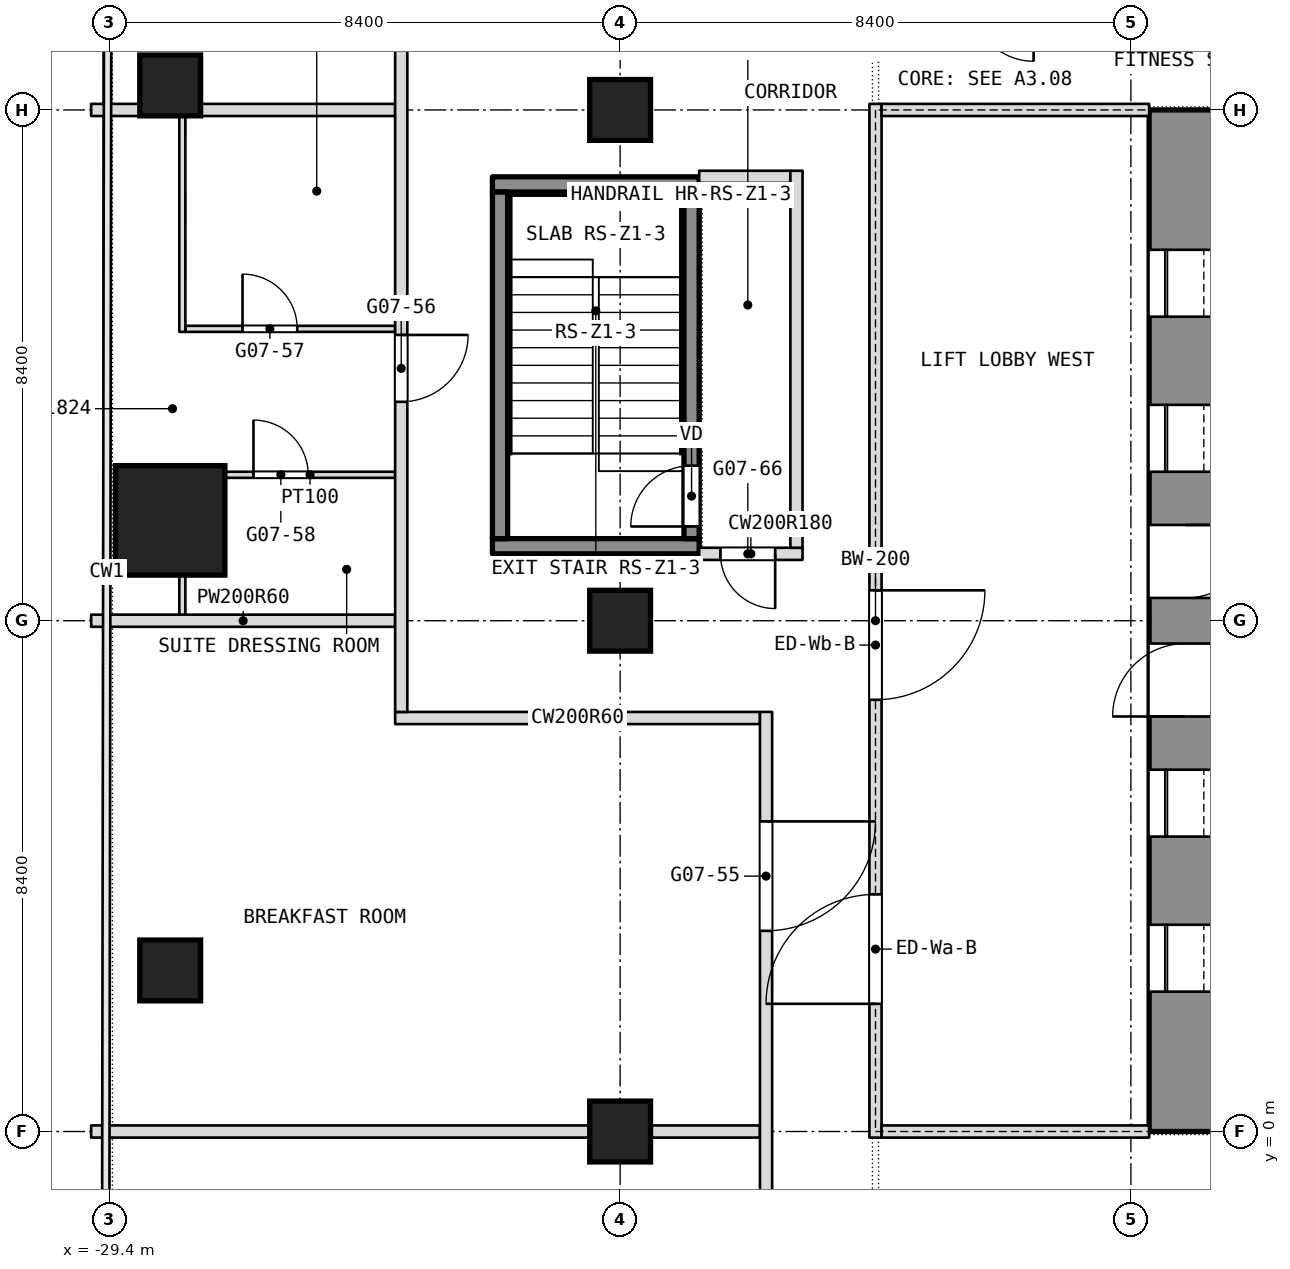
"""IFC4 building model, lengths in metres.
Left out: names, types, materials, properties, quantities, classifications, styles, units other than length and angle.
Written with IfcOpenShell. Run it as: python <this file> out.ifc"""

import sys

from ifc_helpers import new_model, si_unit, direction, frame, frame_2d, origin, origin_2d, place, context, subcontext, project, spatial, rectangle, extrude, element, fill, save


model = new_model("IFC4")
c1 = context("Model", 3, precision=1e-05, world=origin(), true_north=direction((0.0, 1.0)))
c2 = subcontext(c1, "Body", "Model", "MODEL_VIEW")
j1 = project(units=[si_unit("LENGTHUNIT", "METRE"), si_unit("PLANEANGLEUNIT", "RADIAN")], contexts=[c1])
p1 = place(None, origin())
s1 = spatial("IfcSite", under=j1, at=p1, CompositionType="ELEMENT")
p2 = place(p1, origin())
s2 = spatial("IfcBuilding", under=s1, at=p2, CompositionType="ELEMENT")
p3 = place(p2, frame((0.0, 0.0, 79.7)))
s3 = spatial("IfcBuildingStorey", under=s2, at=p3, CompositionType="ELEMENT", Elevation=79.7)
p4 = place(p3, frame((-11.7, 0.0, 0.0), z_axis=(0.0, 0.0, 1.0), x_axis=(0.0, 1.0, 0.0)))
e1 = element("IfcWall", 1, at=p4, inside=s3, PredefinedType="SHEAR", context=c2, shape_type="SweptSolid", body=[
    extrude(rectangle(XDim=16.8, YDim=1.2, at=frame_2d((8.4, 0.0))), origin(), (0.0, 0.0, 1.0), 3.6),
])
p5 = place(p4, frame((2.3, 0.0, 0.0)))
e2 = element("IfcOpeningElement", 2, at=p5, cuts=e1, PredefinedType="OPENING", context=c2, shape_type="SweptSolid", body=[
    extrude(rectangle(XDim=1.1, YDim=2.1, at=frame_2d((0.55, 1.05))), frame((0.0, 0.6, 0.0), z_axis=(0.0, -1.0, 0.0), x_axis=(1.0, 0.0, 0.0)), (0.0, 0.0, 1.0), 1.2),
])
p6 = place(p4, frame((4.85, 0.0, 0.0)))
e3 = element("IfcOpeningElement", 3, at=p6, cuts=e1, PredefinedType="OPENING", context=c2, shape_type="SweptSolid", body=[
    extrude(rectangle(XDim=1.1, YDim=2.1, at=frame_2d((0.55, 1.05))), frame((0.0, 0.6, 0.0), z_axis=(0.0, -1.0, 0.0), x_axis=(1.0, 0.0, 0.0)), (0.0, 0.0, 1.0), 1.2),
])
p7 = place(p4, frame((6.825, 0.0, 0.0)))
e4 = element("IfcOpeningElement", 4, at=p7, cuts=e1, PredefinedType="OPENING", context=c2, shape_type="SweptSolid", body=[
    extrude(rectangle(XDim=1.2, YDim=2.1, at=frame_2d((0.6, 1.05))), frame((0.0, 0.6, 0.0), z_axis=(0.0, -1.0, 0.0), x_axis=(1.0, 0.0, 0.0)), (0.0, 0.0, 1.0), 1.2),
])
p8 = place(p4, frame((13.4, 0.0, 0.0)))
e5 = element("IfcOpeningElement", 5, at=p8, cuts=e1, PredefinedType="OPENING", context=c2, shape_type="SweptSolid", body=[
    extrude(rectangle(XDim=1.1, YDim=2.1, at=frame_2d((0.55, 1.05))), frame((0.0, 0.6, 0.0), z_axis=(0.0, -1.0, 0.0), x_axis=(1.0, 0.0, 0.0)), (0.0, 0.0, 1.0), 1.2),
])
p9 = place(p4, frame((10.85, 0.0, 0.0)))
e6 = element("IfcOpeningElement", 6, at=p9, cuts=e1, PredefinedType="OPENING", context=c2, shape_type="SweptSolid", body=[
    extrude(rectangle(XDim=1.1, YDim=2.1, at=frame_2d((0.55, 1.05))), frame((0.0, 0.6, 0.0), z_axis=(0.0, -1.0, 0.0), x_axis=(1.0, 0.0, 0.0)), (0.0, 0.0, 1.0), 1.2),
])
p10 = place(p4, frame((8.775, 0.0, 0.0)))
e7 = element("IfcOpeningElement", 7, at=p10, cuts=e1, PredefinedType="OPENING", context=c2, shape_type="SweptSolid", body=[
    extrude(rectangle(XDim=1.2, YDim=2.1, at=frame_2d((0.6, 1.05))), frame((0.0, 0.6, 0.0), z_axis=(0.0, -1.0, 0.0), x_axis=(1.0, 0.0, 0.0)), (0.0, 0.0, 1.0), 1.2),
])
p11 = place(p3, frame((-28.4, 10.05, 0.0), z_axis=(0.0, 0.0, 1.0), x_axis=(1.0, 0.0, 0.0)))
e8 = element("IfcColumn", 8, at=p11, inside=s3, PredefinedType="COLUMN", context=c2, shape_type="SweptSolid", body=[
    extrude(rectangle(XDim=1.8, YDim=1.8, at=origin_2d()), origin(), (0.0, 0.0, 1.0), 3.6),
])
for number, where, z_axis, x_axis in (
    (9, (-21.0, 0.0, 0.0), (0.0, 0.0, 1.0), (1.0, 0.0, 0.0)),
    (10, (-21.0, 8.4, 0.0), (0.0, 0.0, 1.0), (1.0, 0.0, 0.0)),
    (11, (-21.0, 16.8, 0.0), (0.0, 0.0, 1.0), (1.0, 0.0, 0.0)),
    (12, (-28.4, 2.649, 0.0), (0.0, 0.0, 1.0), (1.0, 0.0, 0.0)),
    (13, (-28.4, 17.203, 0.0), (0.0, 0.0, 1.0), (1.0, 0.0, 0.0)),
):
    element("IfcColumn", number, at=place(p3, frame(where, z_axis=z_axis, x_axis=x_axis)), inside=s3, PredefinedType="COLUMN", context=c2, shape_type="SweptSolid", body=[
        extrude(rectangle(XDim=1.0, YDim=1.0, at=origin_2d()), origin(), (0.0, 0.0, 1.0), 3.6),
    ])
p12 = place(p3, frame((-29.7, 0.0, 0.0), z_axis=(0.0, 0.0, 1.0), x_axis=(1.0, 0.0, 0.0)))
e14 = element("IfcWall", 14, at=p12, inside=s3, PredefinedType="PARTITIONING", context=c2, shape_type="SweptSolid", body=[
    extrude(rectangle(XDim=11.0, YDim=0.2, at=frame_2d((5.5, 0.0))), origin(), (0.0, 0.0, 1.0), 2.84),
])
p13 = place(p3, frame((-24.7, 6.8, 0.0), z_axis=(0.0, 0.0, 1.0), x_axis=(1.0, 0.0, 0.0)))
e15 = element("IfcWall", 15, at=p13, inside=s3, PredefinedType="PARTITIONING", context=c2, shape_type="SweptSolid", body=[
    extrude(rectangle(XDim=6.0, YDim=0.2, at=frame_2d((3.0, 0.0))), origin(), (0.0, 0.0, 1.0), 3.34),
])
p14 = place(p3, frame((-29.7, 8.4, 0.0), z_axis=(0.0, 0.0, 1.0), x_axis=(1.0, 0.0, 0.0)))
e16 = element("IfcWall", 16, at=p14, inside=s3, PredefinedType="PARTITIONING", context=c2, shape_type="SweptSolid", body=[
    extrude(rectangle(XDim=5.0, YDim=0.2, at=frame_2d((2.5, 0.0))), origin(), (0.0, 0.0, 1.0), 2.84),
])
p15 = place(p3, frame((-19.7, 9.5, 0.0), z_axis=(0.0, 0.0, 1.0), x_axis=(1.0, 0.0, 0.0)))
e17 = element("IfcWall", 17, at=p15, inside=s3, PredefinedType="PARTITIONING", context=c2, shape_type="SweptSolid", body=[
    extrude(rectangle(XDim=1.7, YDim=0.2, at=frame_2d((0.85, 0.0))), origin(), (0.0, 0.0, 1.0), 3.34),
])
p16 = place(p15, frame((0.35, 0.0, 0.0)))
e18 = element("IfcOpeningElement", 18, at=p16, cuts=e17, PredefinedType="OPENING", context=c2, shape_type="SweptSolid", body=[
    extrude(rectangle(XDim=0.9, YDim=2.1, at=frame_2d((0.45, 1.05))), frame((0.0, 0.1, 0.0), z_axis=(0.0, -1.0, 0.0), x_axis=(1.0, 0.0, 0.0)), (0.0, 0.0, 1.0), 0.2),
])
p17 = place(p3, frame((-27.5, 10.8, 0.0), z_axis=(0.0, 0.0, 1.0), x_axis=(1.0, 0.0, 0.0)))
e19 = element("IfcWall", 19, at=p17, inside=s3, PredefinedType="PARTITIONING", context=c2, shape_type="SweptSolid", body=[
    extrude(rectangle(XDim=2.8, YDim=0.1, at=frame_2d((1.4, 0.0))), origin(), (0.0, 0.0, 1.0), 3.34),
])
p18 = place(p17, frame((0.47, 0.0, 0.0)))
e20 = element("IfcOpeningElement", 20, at=p18, cuts=e19, PredefinedType="OPENING", context=c2, shape_type="SweptSolid", body=[
    extrude(rectangle(XDim=0.9, YDim=2.1, at=frame_2d((0.45, 1.05))), frame((0.0, 0.05, 0.0), z_axis=(0.0, -1.0, 0.0), x_axis=(1.0, 0.0, 0.0)), (0.0, 0.0, 1.0), 0.1),
])
p19 = place(p3, frame((-28.15, 13.2, 0.0), z_axis=(0.0, 0.0, 1.0), x_axis=(1.0, 0.0, 0.0)))
e21 = element("IfcWall", 21, at=p19, inside=s3, PredefinedType="PARTITIONING", context=c2, shape_type="SweptSolid", body=[
    extrude(rectangle(XDim=3.45, YDim=0.1, at=frame_2d((1.725, 0.0))), origin(), (0.0, 0.0, 1.0), 3.34),
])
p20 = place(p19, frame((0.94, 0.0, 0.0)))
e22 = element("IfcOpeningElement", 22, at=p20, cuts=e21, PredefinedType="OPENING", context=c2, shape_type="SweptSolid", body=[
    extrude(rectangle(XDim=0.9, YDim=2.1, at=frame_2d((0.45, 1.05))), frame((0.0, 0.05, 0.0), z_axis=(0.0, -1.0, 0.0), x_axis=(1.0, 0.0, 0.0)), (0.0, 0.0, 1.0), 0.1),
])
p21 = place(p3, frame((-19.7, 15.7, 0.0), z_axis=(0.0, 0.0, 1.0), x_axis=(1.0, 0.0, 0.0)))
e23 = element("IfcWall", 23, at=p21, inside=s3, PredefinedType="PARTITIONING", context=c2, shape_type="SweptSolid", body=[
    extrude(rectangle(XDim=1.5, YDim=0.2, at=frame_2d((0.75, 0.0))), origin(), (0.0, 0.0, 1.0), 3.34),
])
p22 = place(p3, frame((-29.7, 16.8, 0.0), z_axis=(0.0, 0.0, 1.0), x_axis=(1.0, 0.0, 0.0)))
e24 = element("IfcWall", 24, at=p22, inside=s3, PredefinedType="PARTITIONING", context=c2, shape_type="SweptSolid", body=[
    extrude(rectangle(XDim=5.0, YDim=0.2, at=frame_2d((2.5, 0.0))), origin(), (0.0, 0.0, 1.0), 2.84),
])
p23 = place(p3, frame((-18.1, 9.6, 0.0), z_axis=(0.0, 0.0, 1.0), x_axis=(0.0, 1.0, 0.0)))
e25 = element("IfcWall", 25, at=p23, inside=s3, PredefinedType="PARTITIONING", context=c2, shape_type="SweptSolid", body=[
    extrude(rectangle(XDim=6.2, YDim=0.2, at=frame_2d((3.1, 0.0))), origin(), (0.0, 0.0, 1.0), 3.34),
])
p24 = place(p3, frame((-18.6, -16.665, 0.0), z_axis=(0.0, 0.0, 1.0), x_axis=(0.0, 1.0, 0.0)))
e26 = element("IfcWall", 26, at=p24, inside=s3, PredefinedType="PARTITIONING", context=c2, shape_type="SweptSolid", body=[
    extrude(rectangle(XDim=23.565, YDim=0.2, at=frame_2d((11.782, 0.0))), origin(), (0.0, 0.0, 1.0), 3.34),
])
p25 = place(p24, frame((4.0, 0.0, 0.0)))
e27 = element("IfcOpeningElement", 27, at=p25, cuts=e26, PredefinedType="OPENING", context=c2, shape_type="SweptSolid", body=[
    extrude(rectangle(XDim=1.1, YDim=2.1, at=frame_2d((0.55, 1.05))), frame((0.0, 0.1, 0.0), z_axis=(0.0, -1.0, 0.0), x_axis=(1.0, 0.0, 0.0)), (0.0, 0.0, 1.0), 0.2),
])
p26 = place(p24, frame((11.565, 0.0, 0.0)))
e28 = element("IfcOpeningElement", 28, at=p26, cuts=e26, PredefinedType="OPENING", context=c2, shape_type="SweptSolid", body=[
    extrude(rectangle(XDim=1.8, YDim=2.1, at=frame_2d((0.9, 1.05))), frame((0.0, 0.1, 0.0), z_axis=(0.0, -1.0, 0.0), x_axis=(1.0, 0.0, 0.0)), (0.0, 0.0, 1.0), 0.2),
])
p27 = place(p24, frame((19.965, 0.0, 0.0)))
e29 = element("IfcOpeningElement", 29, at=p27, cuts=e26, PredefinedType="OPENING", context=c2, shape_type="SweptSolid", body=[
    extrude(rectangle(XDim=1.8, YDim=2.1, at=frame_2d((0.9, 1.05))), frame((0.0, 0.1, 0.0), z_axis=(0.0, -1.0, 0.0), x_axis=(1.0, 0.0, 0.0)), (0.0, 0.0, 1.0), 0.2),
])
p28 = place(p3, frame((-24.6, 6.9, 0.0), z_axis=(0.0, 0.0, 1.0), x_axis=(0.0, 1.0, 0.0)))
e30 = element("IfcWall", 30, at=p28, inside=s3, PredefinedType="PARTITIONING", context=c2, shape_type="SweptSolid", body=[
    extrude(rectangle(XDim=11.6, YDim=0.2, at=frame_2d((5.8, 0.0))), origin(), (0.0, 0.0, 1.0), 3.34),
])
p29 = place(p28, frame((5.1, 0.0, 0.0)))
e31 = element("IfcOpeningElement", 31, at=p29, cuts=e30, PredefinedType="OPENING", context=c2, shape_type="SweptSolid", body=[
    extrude(rectangle(XDim=1.1, YDim=2.1, at=frame_2d((0.55, 1.05))), frame((0.0, 0.1, 0.0), z_axis=(0.0, -1.0, 0.0), x_axis=(1.0, 0.0, 0.0)), (0.0, 0.0, 1.0), 0.2),
])
p30 = place(p3, frame((-28.2, 8.5, 0.0), z_axis=(0.0, 0.0, 1.0), x_axis=(0.0, 1.0, 0.0)))
e32 = element("IfcWall", 32, at=p30, inside=s3, PredefinedType="PARTITIONING", context=c2, shape_type="SweptSolid", body=[
    extrude(rectangle(XDim=0.65, YDim=0.1, at=frame_2d((0.325, 0.0))), origin(), (0.0, 0.0, 1.0), 2.94),
])
p31 = place(p3, frame((-28.2, 13.15, 0.0), z_axis=(0.0, 0.0, 1.0), x_axis=(0.0, 1.0, 0.0)))
e33 = element("IfcWall", 33, at=p31, inside=s3, PredefinedType="PARTITIONING", context=c2, shape_type="SweptSolid", body=[
    extrude(rectangle(XDim=3.75, YDim=0.1, at=frame_2d((1.875, 0.0))), origin(), (0.0, 0.0, 1.0), 2.94),
])
p32 = place(p3, frame((-16.8, -0.1, 0.0), z_axis=(0.0, 0.0, 1.0), x_axis=(0.0, 1.0, 0.0)))
e34 = element("IfcWall", 34, at=p32, inside=s3, PredefinedType="PARTITIONING", context=c2, shape_type="SweptSolid", body=[
    extrude(rectangle(XDim=17.0, YDim=0.2, at=frame_2d((8.5, 0.0))), origin(), (0.0, 0.0, 1.0), 3.34),
])
p33 = place(p32, frame((2.2, 0.0, 0.0)))
e35 = element("IfcOpeningElement", 35, at=p33, cuts=e34, PredefinedType="OPENING", context=c2, shape_type="SweptSolid", body=[
    extrude(rectangle(XDim=1.8, YDim=2.1, at=frame_2d((0.9, 1.05))), frame((0.0, 0.1, 0.0), z_axis=(0.0, -1.0, 0.0), x_axis=(1.0, 0.0, 0.0)), (0.0, 0.0, 1.0), 0.2),
])
p34 = place(p32, frame((7.2, 0.0, 0.0)))
e36 = element("IfcOpeningElement", 36, at=p34, cuts=e34, PredefinedType="OPENING", context=c2, shape_type="SweptSolid", body=[
    extrude(rectangle(XDim=1.8, YDim=2.1, at=frame_2d((0.9, 1.05))), frame((0.0, 0.1, 0.0), z_axis=(0.0, -1.0, 0.0), x_axis=(1.0, 0.0, 0.0)), (0.0, 0.0, 1.0), 0.2),
])
for number, where, z_axis, x_axis in (
    (37, (-16.7, 0.0, 0.0), (0.0, 0.0, 1.0), (1.0, 0.0, 0.0)),
    (38, (-16.7, 16.8, 0.0), (0.0, 0.0, 1.0), (1.0, 0.0, 0.0)),
):
    element("IfcWall", number, at=place(p3, frame(where, z_axis=z_axis, x_axis=x_axis)), inside=s3, PredefinedType="PARTITIONING", context=c2, shape_type="SweptSolid", body=[
        extrude(rectangle(XDim=4.4, YDim=0.2, at=frame_2d((2.2, 0.0))), origin(), (0.0, 0.0, 1.0), 2.84),
    ])
for number, where, z_axis, x_axis in (
    (39, (-23.1, 9.625, 0.1), (0.0, 0.0, 1.0), (1.0, 0.0, 0.0)),
    (40, (-23.1, 15.575, 0.1), (0.0, 0.0, 1.0), (1.0, 0.0, 0.0)),
):
    element("IfcWall", number, at=place(p3, frame(where, z_axis=z_axis, x_axis=x_axis)), inside=s3, PredefinedType="SHEAR", context=c2, shape_type="SweptSolid", body=[
        extrude(rectangle(XDim=3.4, YDim=0.25, at=frame_2d((1.7, 0.0))), origin(), (0.0, 0.0, 1.0), 3.6),
    ])
p35 = place(p3, frame((-22.975, 9.75, 0.1), z_axis=(0.0, 0.0, 1.0), x_axis=(0.0, 1.0, 0.0)))
e41 = element("IfcWall", 41, at=p35, inside=s3, PredefinedType="SHEAR", context=c2, shape_type="SweptSolid", body=[
    extrude(rectangle(XDim=5.7, YDim=0.25, at=frame_2d((2.85, 0.0))), origin(), (0.0, 0.0, 1.0), 3.6),
])
p36 = place(p3, frame((-19.825, 9.75, 0.1), z_axis=(0.0, 0.0, 1.0), x_axis=(0.0, 1.0, 0.0)))
e42 = element("IfcWall", 42, at=p36, inside=s3, PredefinedType="SHEAR", context=c2, shape_type="SweptSolid", body=[
    extrude(rectangle(XDim=5.7, YDim=0.25, at=frame_2d((2.85, 0.0))), origin(), (0.0, 0.0, 1.0), 3.6),
])
p37 = place(p36, frame((0.2, 0.0, 0.0)))
e43 = element("IfcOpeningElement", 43, at=p37, cuts=e42, PredefinedType="OPENING", context=c2, shape_type="SweptSolid", body=[
    extrude(rectangle(XDim=1.0, YDim=2.1, at=frame_2d((0.5, 1.05))), frame((0.0, 0.125, 0.0), z_axis=(0.0, -1.0, 0.0), x_axis=(1.0, 0.0, 0.0)), (0.0, 0.0, 1.0), 0.25),
])
p38 = place(p16, origin())
e44 = element("IfcDoor", 44, at=p38, inside=s3, OperationType="SINGLE_SWING_RIGHT", PredefinedType="DOOR", context=c2, shape_type="SweptSolid", body=[
    extrude(rectangle(XDim=0.9, YDim=2.1, at=frame_2d((0.45, 1.05))), frame((0.0, 0.025, 0.0), z_axis=(0.0, -1.0, 0.0), x_axis=(1.0, 0.0, 0.0)), (0.0, 0.0, 1.0), 0.05),
])
fill(e18, e44)
p39 = place(p18, origin())
e45 = element("IfcDoor", 45, at=p39, inside=s3, OperationType="SINGLE_SWING_RIGHT", PredefinedType="DOOR", context=c2, shape_type="SweptSolid", body=[
    extrude(rectangle(XDim=0.9, YDim=2.1, at=frame_2d((0.45, 1.05))), frame((0.0, 0.025, 0.0), z_axis=(0.0, -1.0, 0.0), x_axis=(1.0, 0.0, 0.0)), (0.0, 0.0, 1.0), 0.05),
])
fill(e20, e45)
p40 = place(p20, origin())
e46 = element("IfcDoor", 46, at=p40, inside=s3, OperationType="SINGLE_SWING_LEFT", PredefinedType="DOOR", context=c2, shape_type="SweptSolid", body=[
    extrude(rectangle(XDim=0.9, YDim=2.1, at=frame_2d((0.45, 1.05))), frame((0.0, 0.025, 0.0), z_axis=(0.0, -1.0, 0.0), x_axis=(1.0, 0.0, 0.0)), (0.0, 0.0, 1.0), 0.05),
])
fill(e22, e46)
p41 = place(p27, origin())
e47 = element("IfcDoor", 47, at=p41, inside=s3, OperationType="DOUBLE_DOOR_SINGLE_SWING", PredefinedType="DOOR", context=c2, shape_type="SweptSolid", body=[
    extrude(rectangle(XDim=1.8, YDim=2.1, at=frame_2d((0.9, 1.05))), frame((0.0, 0.025, 0.0), z_axis=(0.0, -1.0, 0.0), x_axis=(1.0, 0.0, 0.0)), (0.0, 0.0, 1.0), 0.05),
])
fill(e29, e47)
p42 = place(p29, origin())
e48 = element("IfcDoor", 48, at=p42, inside=s3, OperationType="SINGLE_SWING_RIGHT", PredefinedType="DOOR", context=c2, shape_type="SweptSolid", body=[
    extrude(rectangle(XDim=1.1, YDim=2.1, at=frame_2d((0.55, 1.05))), frame((0.0, 0.025, 0.0), z_axis=(0.0, -1.0, 0.0), x_axis=(1.0, 0.0, 0.0)), (0.0, 0.0, 1.0), 0.05),
])
fill(e31, e48)
p43 = place(p37, origin())
e49 = element("IfcDoor", 49, at=p43, inside=s3, OperationType="SINGLE_SWING_LEFT", PredefinedType="DOOR", context=c2, shape_type="SweptSolid", body=[
    extrude(rectangle(XDim=1.0, YDim=2.1, at=frame_2d((0.5, 1.05))), frame((0.0, 0.025, 0.0), z_axis=(0.0, -1.0, 0.0), x_axis=(1.0, 0.0, 0.0)), (0.0, 0.0, 1.0), 0.05),
])
fill(e43, e49)
p44 = place(p5, origin())
e50 = element("IfcDoor", 50, at=p44, inside=s3, OperationType="SLIDING_TO_LEFT", PredefinedType="DOOR", context=c2, shape_type="SweptSolid", body=[
    extrude(rectangle(XDim=1.1, YDim=2.1, at=frame_2d((0.55, 1.05))), frame((0.0, 0.025, 0.0), z_axis=(0.0, -1.0, 0.0), x_axis=(1.0, 0.0, 0.0)), (0.0, 0.0, 1.0), 0.05),
])
fill(e2, e50)
p45 = place(p6, origin())
e51 = element("IfcDoor", 51, at=p45, inside=s3, OperationType="SLIDING_TO_LEFT", PredefinedType="DOOR", context=c2, shape_type="SweptSolid", body=[
    extrude(rectangle(XDim=1.1, YDim=2.1, at=frame_2d((0.55, 1.05))), frame((0.0, 0.025, 0.0), z_axis=(0.0, -1.0, 0.0), x_axis=(1.0, 0.0, 0.0)), (0.0, 0.0, 1.0), 0.05),
])
fill(e3, e51)
p46 = place(p7, origin())
e52 = element("IfcDoor", 52, at=p46, inside=s3, OperationType="SINGLE_SWING_LEFT", PredefinedType="DOOR", context=c2, shape_type="SweptSolid", body=[
    extrude(rectangle(XDim=1.2, YDim=2.1, at=frame_2d((0.6, 1.05))), frame((0.0, 0.025, 0.0), z_axis=(0.0, -1.0, 0.0), x_axis=(1.0, 0.0, 0.0)), (0.0, 0.0, 1.0), 0.05),
])
fill(e4, e52)
p47 = place(p8, origin())
e53 = element("IfcDoor", 53, at=p47, inside=s3, OperationType="SLIDING_TO_LEFT", PredefinedType="DOOR", context=c2, shape_type="SweptSolid", body=[
    extrude(rectangle(XDim=1.1, YDim=2.1, at=frame_2d((0.55, 1.05))), frame((0.0, 0.025, 0.0), z_axis=(0.0, -1.0, 0.0), x_axis=(1.0, 0.0, 0.0)), (0.0, 0.0, 1.0), 0.05),
])
fill(e5, e53)
p48 = place(p9, origin())
e54 = element("IfcDoor", 54, at=p48, inside=s3, OperationType="SLIDING_TO_LEFT", PredefinedType="DOOR", context=c2, shape_type="SweptSolid", body=[
    extrude(rectangle(XDim=1.1, YDim=2.1, at=frame_2d((0.55, 1.05))), frame((0.0, 0.025, 0.0), z_axis=(0.0, -1.0, 0.0), x_axis=(1.0, 0.0, 0.0)), (0.0, 0.0, 1.0), 0.05),
])
fill(e6, e54)
p49 = place(p10, origin())
e55 = element("IfcDoor", 55, at=p49, inside=s3, OperationType="SINGLE_SWING_LEFT", PredefinedType="DOOR", context=c2, shape_type="SweptSolid", body=[
    extrude(rectangle(XDim=1.2, YDim=2.1, at=frame_2d((0.6, 1.05))), frame((0.0, 0.025, 0.0), z_axis=(0.0, -1.0, 0.0), x_axis=(1.0, 0.0, 0.0)), (0.0, 0.0, 1.0), 0.05),
])
fill(e7, e55)
p50 = place(p33, origin())
e56 = element("IfcDoor", 56, at=p50, inside=s3, OperationType="DOUBLE_DOOR_SINGLE_SWING", PredefinedType="DOOR", context=c2, shape_type="SweptSolid", body=[
    extrude(rectangle(XDim=1.8, YDim=2.1, at=frame_2d((0.9, 1.05))), frame((0.0, 0.025, 0.0), z_axis=(0.0, -1.0, 0.0), x_axis=(1.0, 0.0, 0.0)), (0.0, 0.0, 1.0), 0.05),
])
fill(e35, e56)
p51 = place(p34, origin())
e57 = element("IfcDoor", 57, at=p51, inside=s3, OperationType="DOUBLE_DOOR_SINGLE_SWING", PredefinedType="DOOR", context=c2, shape_type="SweptSolid", body=[
    extrude(rectangle(XDim=1.8, YDim=2.1, at=frame_2d((0.9, 1.05))), frame((0.0, 0.025, 0.0), z_axis=(0.0, -1.0, 0.0), x_axis=(1.0, 0.0, 0.0)), (0.0, 0.0, 1.0), 0.05),
])
fill(e36, e57)
save(model, sys.argv[1])
